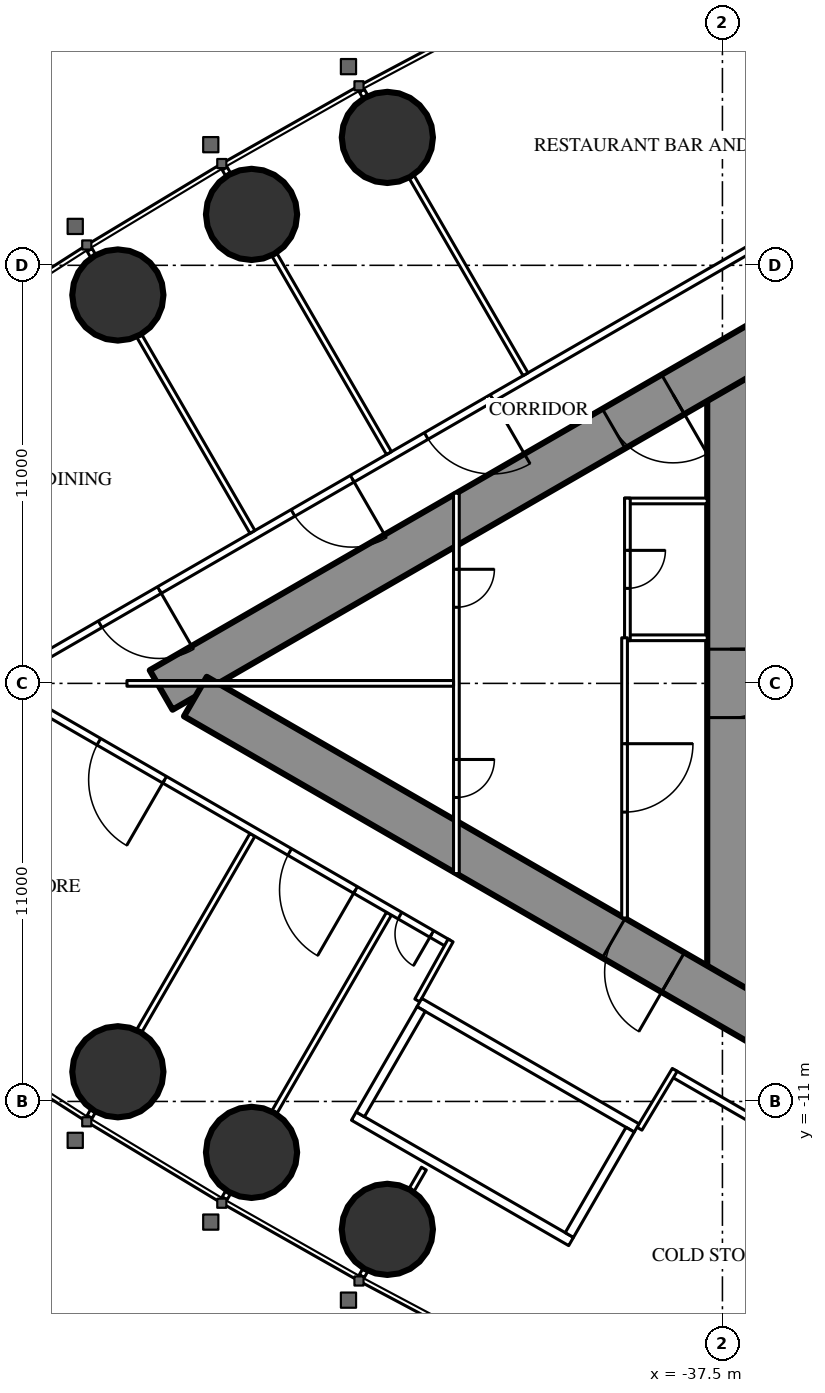
"""IFC4 building model, lengths in metres.
Left out: names, types, materials, properties, quantities, classifications, styles, units other than length and angle.
Written with IfcOpenShell. Run it as: python <this file> out.ifc"""

import sys

from ifc_helpers import new_model, si_unit, direction, frame, frame_2d, origin, origin_2d, place, context, subcontext, project, spatial, rectangle, circle, extrude, element, fill, save


model = new_model("IFC4")
c1 = context("Model", 3, precision=1e-05, world=origin(), true_north=direction((0.0, 1.0)))
c2 = subcontext(c1, "Body", "Model", "MODEL_VIEW")
j1 = project(units=[si_unit("LENGTHUNIT", "METRE"), si_unit("PLANEANGLEUNIT", "RADIAN")], contexts=[c1])
p1 = place(None, origin())
s1 = spatial("IfcSite", under=j1, at=p1, CompositionType="ELEMENT")
p2 = place(p1, origin())
s2 = spatial("IfcBuilding", under=s1, at=p2, CompositionType="ELEMENT")
p3 = place(p2, frame((0.0, 0.0, 251.9)))
s3 = spatial("IfcBuildingStorey", under=s2, at=p3, CompositionType="ELEMENT", Elevation=251.9)
for number, where, z_axis, x_axis in (
    (1, (-53.408, -10.219, 0.0), (0.0, 0.0, 1.0), (1.0, 0.0, 0.0)),
    (2, (-49.89, -12.34, 0.0), (0.0, 0.0, 1.0), (1.0, 0.0, 0.0)),
    (3, (-46.317, -14.365, 0.0), (0.0, 0.0, 1.0), (1.0, 0.0, 0.0)),
    (4, (-46.317, 14.365, 0.0), (0.0, 0.0, 1.0), (1.0, 0.0, 0.0)),
    (5, (-49.89, 12.34, 0.0), (0.0, 0.0, 1.0), (1.0, 0.0, 0.0)),
    (6, (-53.408, 10.219, 0.0), (0.0, 0.0, 1.0), (1.0, 0.0, 0.0)),
):
    element("IfcColumn", number, at=place(p3, frame(where, z_axis=z_axis, x_axis=x_axis)), inside=s3, PredefinedType="COLUMN", context=c2, shape_type="SweptSolid", body=[
        extrude(circle(Radius=1.2, at=origin_2d()), origin(), (0.0, 0.0, 1.0), 5.4),
    ])
p4 = place(p3, frame((-37.3, 8.6, 0.0), z_axis=(0.0, 0.0, 1.0), x_axis=(0.0, -1.0, 0.0)))
e7 = element("IfcWall", 7, at=p4, inside=s3, PredefinedType="SHEAR", context=c2, shape_type="SweptSolid", body=[
    extrude(rectangle(XDim=17.2, YDim=1.2, at=frame_2d((8.6, 0.0))), origin(), (0.0, 0.0, 1.0), 5.4),
])
p5 = place(p4, frame((7.7, 0.0, 0.0)))
e8 = element("IfcOpeningElement", 8, at=p5, cuts=e7, PredefinedType="OPENING", context=c2, shape_type="SweptSolid", body=[
    extrude(rectangle(XDim=1.8, YDim=2.2, at=frame_2d((0.9, 1.1))), frame((0.0, 0.61, 0.0), z_axis=(0.0, -1.0, 0.0), x_axis=(1.0, 0.0, 0.0)), (0.0, 0.0, 1.0), 1.22),
])
p6 = place(p3, frame((-27.2, 14.3, 0.0), z_axis=(0.0, 0.0, 1.0), x_axis=(-0.866026593062, -0.499997940104, 0.0)))
e9 = element("IfcWall", 9, at=p6, inside=s3, PredefinedType="SHEAR", context=c2, shape_type="SweptSolid", body=[
    extrude(rectangle(XDim=28.946, YDim=1.2, at=frame_2d((14.473, 0.0))), origin(), (0.0, 0.0, 1.0), 5.4),
])
p7 = place(p6, frame((4.6, 0.0, 0.0)))
e10 = element("IfcOpeningElement", 10, at=p7, cuts=e9, PredefinedType="OPENING", context=c2, shape_type="SweptSolid", body=[
    extrude(rectangle(XDim=1.0, YDim=2.2, at=frame_2d((0.5, 1.1))), frame((0.0, 0.61, 0.0), z_axis=(0.0, -1.0, 0.0), x_axis=(1.0, 0.0, 0.0)), (0.0, 0.0, 1.0), 1.22),
])
p8 = place(p6, frame((13.395, 0.0, 0.0)))
e11 = element("IfcOpeningElement", 11, at=p8, cuts=e9, PredefinedType="OPENING", context=c2, shape_type="SweptSolid", body=[
    extrude(rectangle(XDim=1.8, YDim=2.2, at=frame_2d((0.9, 1.1))), frame((0.0, 0.61, 0.0), z_axis=(0.0, -1.0, 0.0), x_axis=(1.0, 0.0, 0.0)), (0.0, 0.0, 1.0), 1.22),
])
p9 = place(p3, frame((-27.2, -14.3, 0.0), z_axis=(0.0, 0.0, 1.0), x_axis=(-0.866024021859, 0.500002393557, 0.0)))
e12 = element("IfcWall", 12, at=p9, inside=s3, PredefinedType="SHEAR", context=c2, shape_type="SweptSolid", body=[
    extrude(rectangle(XDim=27.907, YDim=1.2, at=frame_2d((13.954, 0.0))), origin(), (0.0, 0.0, 1.0), 5.4),
])
p10 = place(p9, frame((4.6, 0.0, 0.0)))
e13 = element("IfcOpeningElement", 13, at=p10, cuts=e12, PredefinedType="OPENING", context=c2, shape_type="SweptSolid", body=[
    extrude(rectangle(XDim=1.0, YDim=2.2, at=frame_2d((0.5, 1.1))), frame((0.0, 0.61, 0.0), z_axis=(0.0, -1.0, 0.0), x_axis=(1.0, 0.0, 0.0)), (0.0, 0.0, 1.0), 1.22),
])
p11 = place(p9, frame((13.395, 0.0, 0.0)))
e14 = element("IfcOpeningElement", 14, at=p11, cuts=e12, PredefinedType="OPENING", context=c2, shape_type="SweptSolid", body=[
    extrude(rectangle(XDim=1.8, YDim=2.2, at=frame_2d((0.9, 1.1))), frame((0.0, 0.61, 0.0), z_axis=(0.0, -1.0, 0.0), x_axis=(1.0, 0.0, 0.0)), (0.0, 0.0, 1.0), 1.22),
])
p12 = place(p3, frame((-28.681, 16.101, 0.0), z_axis=(0.0, 0.0, 1.0), x_axis=(-0.866024860443, -0.500000941094, 0.0)))
e15 = element("IfcWall", 15, at=p12, inside=s3, PredefinedType="PARTITIONING", context=c2, shape_type="SweptSolid", body=[
    extrude(rectangle(XDim=32.201, YDim=0.2, at=frame_2d((16.101, 0.0))), origin(), (0.0, 0.0, 1.0), 5.15),
])
p13 = place(p12, frame((7.266, 0.0, 0.0)))
e16 = element("IfcOpeningElement", 16, at=p13, cuts=e15, PredefinedType="OPENING", context=c2, shape_type="SweptSolid", body=[
    extrude(rectangle(XDim=1.8, YDim=2.2, at=frame_2d((0.9, 1.1))), frame((0.0, 0.11, 0.0), z_axis=(0.0, -1.0, 0.0), x_axis=(1.0, 0.0, 0.0)), (0.0, 0.0, 1.0), 0.22),
])
p14 = place(p12, frame((17.182, 0.0, 0.0)))
e17 = element("IfcOpeningElement", 17, at=p14, cuts=e15, PredefinedType="OPENING", context=c2, shape_type="SweptSolid", body=[
    extrude(rectangle(XDim=2.0, YDim=2.4, at=frame_2d((1.0, 1.2))), frame((0.0, 0.11, 0.0), z_axis=(0.0, -1.0, 0.0), x_axis=(1.0, 0.0, 0.0)), (0.0, 0.0, 1.0), 0.22),
])
p15 = place(p12, frame((21.43, 0.0, 0.0)))
e18 = element("IfcOpeningElement", 18, at=p15, cuts=e15, PredefinedType="OPENING", context=c2, shape_type="SweptSolid", body=[
    extrude(rectangle(XDim=1.8, YDim=2.2, at=frame_2d((0.9, 1.1))), frame((0.0, 0.11, 0.0), z_axis=(0.0, -1.0, 0.0), x_axis=(1.0, 0.0, 0.0)), (0.0, 0.0, 1.0), 0.22),
])
p16 = place(p12, frame((27.29, 0.0, 0.0)))
e19 = element("IfcOpeningElement", 19, at=p16, cuts=e15, PredefinedType="OPENING", context=c2, shape_type="SweptSolid", body=[
    extrude(rectangle(XDim=1.8, YDim=2.2, at=frame_2d((0.9, 1.1))), frame((0.0, 0.11, 0.0), z_axis=(0.0, -1.0, 0.0), x_axis=(1.0, 0.0, 0.0)), (0.0, 0.0, 1.0), 0.22),
])
p17 = place(p3, frame((-42.68, 8.134, 0.0), z_axis=(0.0, 0.0, 1.0), x_axis=(-0.499984479505, 0.866034364361, 0.0)))
e20 = element("IfcWall", 20, at=p17, inside=s3, PredefinedType="PARTITIONING", context=c2, shape_type="SweptSolid", body=[
    extrude(rectangle(XDim=5.995, YDim=0.15, at=frame_2d((2.998, 0.0))), origin(), (0.0, 0.0, 1.0), 4.25),
])
p18 = place(p3, frame((-46.898, 15.439, 0.0), z_axis=(0.0, 0.0, 1.0), x_axis=(-0.500232303069, 0.865891241997, 0.0)))
e21 = element("IfcWall", 21, at=p18, inside=s3, PredefinedType="PARTITIONING", context=c2, shape_type="SweptSolid", body=[
    extrude(rectangle(XDim=0.18, YDim=0.15, at=frame_2d((0.09, 0.0))), origin(), (0.0, 0.0, 1.0), 4.25),
])
p19 = place(p3, frame((-46.274, 6.059, 0.0), z_axis=(0.0, 0.0, 1.0), x_axis=(-0.500020471368, 0.866013584312, 0.0)))
e22 = element("IfcWall", 22, at=p19, inside=s3, PredefinedType="PARTITIONING", context=c2, shape_type="SweptSolid", body=[
    extrude(rectangle(XDim=6.028, YDim=0.15, at=frame_2d((3.014, 0.0))), origin(), (0.0, 0.0, 1.0), 4.25),
])
p20 = place(p3, frame((-50.508, 13.392, 0.0), z_axis=(0.0, 0.0, 1.0), x_axis=(-0.499644091975, 0.866230789891, 0.0)))
e23 = element("IfcWall", 23, at=p20, inside=s3, PredefinedType="PARTITIONING", context=c2, shape_type="SweptSolid", body=[
    extrude(rectangle(XDim=0.18, YDim=0.15, at=frame_2d((0.09, 0.0))), origin(), (0.0, 0.0, 1.0), 4.25),
])
p21 = place(p3, frame((-49.866, 3.985, 0.0), z_axis=(0.0, 0.0, 1.0), x_axis=(-0.500000694566, 0.866025002776, 0.0)))
e24 = element("IfcWall", 24, at=p21, inside=s3, PredefinedType="PARTITIONING", context=c2, shape_type="SweptSolid", body=[
    extrude(rectangle(XDim=5.95, YDim=0.15, at=frame_2d((2.975, 0.0))), origin(), (0.0, 0.0, 1.0), 4.25),
])
p22 = place(p3, frame((-54.061, 11.25, 0.0), z_axis=(0.0, 0.0, 1.0), x_axis=(-0.500391173478, 0.865799441849, 0.0)))
e25 = element("IfcWall", 25, at=p22, inside=s3, PredefinedType="PARTITIONING", context=c2, shape_type="SweptSolid", body=[
    extrude(rectangle(XDim=0.179, YDim=0.15, at=frame_2d((0.089, 0.0))), origin(), (0.0, 0.0, 1.0), 4.25),
])
p23 = place(p3, frame((-46.898, -15.439, 0.0), z_axis=(0.0, 0.0, 1.0), x_axis=(-0.500232303069, -0.865891241997, 0.0)))
e26 = element("IfcWall", 26, at=p23, inside=s3, PredefinedType="PARTITIONING", context=c2, shape_type="SweptSolid", body=[
    extrude(rectangle(XDim=0.18, YDim=0.15, at=frame_2d((0.09, 0.0))), origin(), (0.0, 0.0, 1.0), 4.25),
])
p24 = place(p3, frame((-46.274, -6.059, 0.0), z_axis=(0.0, 0.0, 1.0), x_axis=(-0.500020471368, -0.866013584312, 0.0)))
e27 = element("IfcWall", 27, at=p24, inside=s3, PredefinedType="PARTITIONING", context=c2, shape_type="SweptSolid", body=[
    extrude(rectangle(XDim=6.028, YDim=0.15, at=frame_2d((3.014, 0.0))), origin(), (0.0, 0.0, 1.0), 4.25),
])
p25 = place(p3, frame((-50.508, -13.392, 0.0), z_axis=(0.0, 0.0, 1.0), x_axis=(-0.499644091975, -0.866230789891, 0.0)))
e28 = element("IfcWall", 28, at=p25, inside=s3, PredefinedType="PARTITIONING", context=c2, shape_type="SweptSolid", body=[
    extrude(rectangle(XDim=0.18, YDim=0.15, at=frame_2d((0.09, 0.0))), origin(), (0.0, 0.0, 1.0), 4.25),
])
p26 = place(p3, frame((-49.866, -3.985, 0.0), z_axis=(0.0, 0.0, 1.0), x_axis=(-0.500000694566, -0.866025002776, 0.0)))
e29 = element("IfcWall", 29, at=p26, inside=s3, PredefinedType="PARTITIONING", context=c2, shape_type="SweptSolid", body=[
    extrude(rectangle(XDim=5.95, YDim=0.15, at=frame_2d((2.975, 0.0))), origin(), (0.0, 0.0, 1.0), 4.25),
])
p27 = place(p3, frame((-54.061, -11.25, 0.0), z_axis=(0.0, 0.0, 1.0), x_axis=(-0.500391173478, -0.865799441849, 0.0)))
e30 = element("IfcWall", 30, at=p27, inside=s3, PredefinedType="PARTITIONING", context=c2, shape_type="SweptSolid", body=[
    extrude(rectangle(XDim=0.179, YDim=0.15, at=frame_2d((0.089, 0.0))), origin(), (0.0, 0.0, 1.0), 4.25),
])
p28 = place(p3, frame((-45.356, -12.767, 0.0), z_axis=(0.0, 0.0, 1.0), x_axis=(-0.499886366516, -0.866091000168, 0.0)))
e31 = element("IfcWall", 31, at=p28, inside=s3, PredefinedType="PARTITIONING", context=c2, shape_type="SweptSolid", body=[
    extrude(rectangle(XDim=0.645, YDim=0.15, at=frame_2d((0.322, 0.0))), origin(), (0.0, 0.0, 1.0), 5.15),
])
p29 = place(p3, frame((-28.681, -16.101, 0.0), z_axis=(0.0, 0.0, 1.0), x_axis=(-0.866026079773, 0.499998829152, 0.0)))
e32 = element("IfcWall", 32, at=p29, inside=s3, PredefinedType="PARTITIONING", context=c2, shape_type="SweptSolid", body=[
    extrude(rectangle(XDim=11.674, YDim=0.2, at=frame_2d((5.837, 0.0))), origin(), (0.0, 0.0, 1.0), 5.15),
])
p30 = place(p29, frame((4.837, 0.0, 0.0)))
e33 = element("IfcOpeningElement", 33, at=p30, cuts=e32, PredefinedType="OPENING", context=c2, shape_type="SweptSolid", body=[
    extrude(rectangle(XDim=2.0, YDim=2.4, at=frame_2d((1.0, 1.2))), frame((0.0, 0.11, 0.0), z_axis=(0.0, -1.0, 0.0), x_axis=(1.0, 0.0, 0.0)), (0.0, 0.0, 1.0), 0.22),
])
p31 = place(p3, frame((-44.715, -6.844, 0.0), z_axis=(0.0, 0.0, 1.0), x_axis=(-0.866025261224, 0.500000246922, 0.0)))
e34 = element("IfcWall", 34, at=p31, inside=s3, PredefinedType="PARTITIONING", context=c2, shape_type="SweptSolid", body=[
    extrude(rectangle(XDim=13.567, YDim=0.2, at=frame_2d((6.783, 0.0))), origin(), (0.0, 0.0, 1.0), 5.15),
])
p32 = place(p31, frame((8.616, 0.0, 0.0)))
e35 = element("IfcOpeningElement", 35, at=p32, cuts=e34, PredefinedType="OPENING", context=c2, shape_type="SweptSolid", body=[
    extrude(rectangle(XDim=2.0, YDim=2.4, at=frame_2d((1.0, 1.2))), frame((0.0, 0.11, 0.0), z_axis=(0.0, -1.0, 0.0), x_axis=(1.0, 0.0, 0.0)), (0.0, 0.0, 1.0), 0.22),
])
p33 = place(p31, frame((2.816, 0.0, 0.0)))
e36 = element("IfcOpeningElement", 36, at=p33, cuts=e34, PredefinedType="OPENING", context=c2, shape_type="SweptSolid", body=[
    extrude(rectangle(XDim=2.0, YDim=2.4, at=frame_2d((1.0, 1.2))), frame((0.0, 0.11, 0.0), z_axis=(0.0, -1.0, 0.0), x_axis=(1.0, 0.0, 0.0)), (0.0, 0.0, 1.0), 0.22),
])
p34 = place(p31, frame((0.5, 0.0, 0.0)))
e37 = element("IfcOpeningElement", 37, at=p34, cuts=e34, PredefinedType="OPENING", context=c2, shape_type="SweptSolid", body=[
    extrude(rectangle(XDim=0.967, YDim=2.2, at=frame_2d((0.483, 1.1))), frame((0.0, 0.11, 0.0), z_axis=(0.0, -1.0, 0.0), x_axis=(1.0, 0.0, 0.0)), (0.0, 0.0, 1.0), 0.22),
])
for number, where, z_axis, x_axis in (
    (38, (-44.652, -6.764, 0.0), (0.0, 0.0, 1.0), (-0.486, -0.874, 0.0)),
    (39, (-39.683, -11.718, 0.0), (0.0, 0.0, 1.0), (0.514, 0.858, 0.0)),
):
    element("IfcWall", number, at=place(p3, frame(where, z_axis=z_axis, x_axis=x_axis)), inside=s3, PredefinedType="PARTITIONING", context=c2, shape_type="SweptSolid", body=[
        extrude(rectangle(XDim=1.805, YDim=0.15, at=frame_2d((0.903, 0.0))), origin(), (0.0, 0.0, 1.0), 5.15),
    ])
for number, where, z_axis, x_axis in (
    (40, (-37.9, 1.2, 0.0), (0.0, 0.0, 1.0), (-1.0, 0.0, 0.0)),
    (41, (-37.9, 4.8, 0.0), (0.0, 0.0, 1.0), (-1.0, 0.0, 0.0)),
):
    element("IfcWall", number, at=place(p3, frame(where, z_axis=z_axis, x_axis=x_axis)), inside=s3, PredefinedType="PARTITIONING", context=c2, shape_type="SweptSolid", body=[
        extrude(rectangle(XDim=2.175, YDim=0.15, at=frame_2d((1.087, 0.0))), origin(), (0.0, 0.0, 1.0), 5.15),
    ])
p35 = place(p3, frame((-40.0, 4.875, 0.0), z_axis=(0.0, 0.0, 1.0), x_axis=(0.0, -1.0, 0.0)))
e42 = element("IfcWall", 42, at=p35, inside=s3, PredefinedType="PARTITIONING", context=c2, shape_type="SweptSolid", body=[
    extrude(rectangle(XDim=3.75, YDim=0.15, at=frame_2d((1.875, 0.0))), origin(), (0.0, 0.0, 1.0), 5.15),
])
p36 = place(p35, frame((1.375, 0.0, 0.0)))
e43 = element("IfcOpeningElement", 43, at=p36, cuts=e42, PredefinedType="OPENING", context=c2, shape_type="SweptSolid", body=[
    extrude(rectangle(XDim=1.0, YDim=2.2, at=frame_2d((0.5, 1.1))), frame((0.0, 0.085, 0.0), z_axis=(0.0, -1.0, 0.0), x_axis=(1.0, 0.0, 0.0)), (0.0, 0.0, 1.0), 0.17),
])
p37 = place(p3, frame((-40.075, 1.2, 0.0), z_axis=(0.0, 0.0, 1.0), x_axis=(0.0, -1.0, 0.0)))
e44 = element("IfcWall", 44, at=p37, inside=s3, PredefinedType="PARTITIONING", context=c2, shape_type="SweptSolid", body=[
    extrude(rectangle(XDim=7.374, YDim=0.15, at=frame_2d((3.687, 0.0))), origin(), (0.0, 0.0, 1.0), 5.15),
])
p38 = place(p37, frame((2.787, 0.0, 0.0)))
e45 = element("IfcOpeningElement", 45, at=p38, cuts=e44, PredefinedType="OPENING", context=c2, shape_type="SweptSolid", body=[
    extrude(rectangle(XDim=1.8, YDim=2.2, at=frame_2d((0.9, 1.1))), frame((0.0, 0.085, 0.0), z_axis=(0.0, -1.0, 0.0), x_axis=(1.0, 0.0, 0.0)), (0.0, 0.0, 1.0), 0.17),
])
p39 = place(p3, frame((-44.5, 5.005, 0.0), z_axis=(0.0, 0.0, 1.0), x_axis=(0.0, -1.0, 0.0)))
e46 = element("IfcWall", 46, at=p39, inside=s3, PredefinedType="PARTITIONING", context=c2, shape_type="SweptSolid", body=[
    extrude(rectangle(XDim=10.009, YDim=0.15, at=frame_2d((5.005, 0.0))), origin(), (0.0, 0.0, 1.0), 4.3),
])
p40 = place(p39, frame((2.002, 0.0, 0.0)))
e47 = element("IfcOpeningElement", 47, at=p40, cuts=e46, PredefinedType="OPENING", context=c2, shape_type="SweptSolid", body=[
    extrude(rectangle(XDim=1.0, YDim=2.2, at=frame_2d((0.5, 1.1))), frame((0.0, 0.085, 0.0), z_axis=(0.0, -1.0, 0.0), x_axis=(1.0, 0.0, 0.0)), (0.0, 0.0, 1.0), 0.17),
])
p41 = place(p39, frame((7.007, 0.0, 0.0)))
e48 = element("IfcOpeningElement", 48, at=p41, cuts=e46, PredefinedType="OPENING", context=c2, shape_type="SweptSolid", body=[
    extrude(rectangle(XDim=1.0, YDim=2.2, at=frame_2d((0.5, 1.1))), frame((0.0, 0.085, 0.0), z_axis=(0.0, -1.0, 0.0), x_axis=(1.0, 0.0, 0.0)), (0.0, 0.0, 1.0), 0.17),
])
p42 = place(p3, frame((-44.575, 0.0, 0.0), z_axis=(0.0, 0.0, 1.0), x_axis=(-1.0, 0.0, 0.0)))
e49 = element("IfcWall", 49, at=p42, inside=s3, PredefinedType="PARTITIONING", context=c2, shape_type="SweptSolid", body=[
    extrude(rectangle(XDim=8.593, YDim=0.15, at=frame_2d((4.297, 0.0))), origin(), (0.0, 0.0, 1.0), 4.25),
])
p43 = place(p3, frame((-39.758, -11.697, 0.0), z_axis=(0.0, 0.0, 1.0), x_axis=(-0.866024194504, 0.500002094529, 0.0)))
e50 = element("IfcWall", 50, at=p43, inside=s3, PredefinedType="PARTITIONING", context=c2, shape_type="SweptSolid", body=[
    extrude(rectangle(XDim=6.6, YDim=0.25, at=frame_2d((3.3, 0.0))), origin(), (0.0, 0.0, 1.0), 5.15),
])
p44 = place(p3, frame((-41.482, -14.686, 0.0), z_axis=(0.0, 0.0, 1.0), x_axis=(-0.86603344179, 0.499986077507, 0.0)))
e51 = element("IfcWall", 51, at=p44, inside=s3, PredefinedType="PARTITIONING", context=c2, shape_type="SweptSolid", body=[
    extrude(rectangle(XDim=6.6, YDim=0.25, at=frame_2d((3.3, 0.0))), origin(), (0.0, 0.0, 1.0), 5.15),
])
for number, where, z_axis, x_axis in (
    (52, (-39.928, -11.743, 0.0), (0.0, 0.0, 1.0), (-0.5, -0.866, 0.0)),
    (53, (-45.428, -8.568, 0.0), (0.0, 0.0, 1.0), (-0.5, -0.866, 0.0)),
):
    element("IfcWall", number, at=place(p3, frame(where, z_axis=z_axis, x_axis=x_axis)), inside=s3, PredefinedType="PARTITIONING", context=c2, shape_type="SweptSolid", body=[
        extrude(rectangle(XDim=3.201, YDim=0.25, at=frame_2d((1.6, 0.0))), origin(), (0.0, 0.0, 1.0), 5.15),
    ])
p45 = place(p14, origin())
e54 = element("IfcDoor", 54, at=p45, inside=s3, OperationType="DOUBLE_DOOR_SINGLE_SWING", PredefinedType="DOOR", context=c2, shape_type="SweptSolid", body=[
    extrude(rectangle(XDim=2.0, YDim=2.4, at=frame_2d((1.0, 1.2))), frame((0.0, 0.025, 0.0), z_axis=(0.0, -1.0, 0.0), x_axis=(1.0, 0.0, 0.0)), (0.0, 0.0, 1.0), 0.05),
])
fill(e17, e54)
p46 = place(p15, origin())
e55 = element("IfcDoor", 55, at=p46, inside=s3, OperationType="DOUBLE_DOOR_SINGLE_SWING", PredefinedType="DOOR", context=c2, shape_type="SweptSolid", body=[
    extrude(rectangle(XDim=1.8, YDim=2.2, at=frame_2d((0.9, 1.1))), frame((0.0, 0.025, 0.0), z_axis=(0.0, -1.0, 0.0), x_axis=(1.0, 0.0, 0.0)), (0.0, 0.0, 1.0), 0.05),
])
fill(e18, e55)
p47 = place(p16, origin())
e56 = element("IfcDoor", 56, at=p47, inside=s3, OperationType="DOUBLE_DOOR_SINGLE_SWING", PredefinedType="DOOR", context=c2, shape_type="SweptSolid", body=[
    extrude(rectangle(XDim=1.8, YDim=2.2, at=frame_2d((0.9, 1.1))), frame((0.0, 0.025, 0.0), z_axis=(0.0, -1.0, 0.0), x_axis=(1.0, 0.0, 0.0)), (0.0, 0.0, 1.0), 0.05),
])
fill(e19, e56)
p48 = place(p32, origin())
e57 = element("IfcDoor", 57, at=p48, inside=s3, OperationType="DOUBLE_DOOR_SINGLE_SWING", PredefinedType="DOOR", context=c2, shape_type="SweptSolid", body=[
    extrude(rectangle(XDim=2.0, YDim=2.4, at=frame_2d((1.0, 1.2))), frame((0.0, 0.025, 0.0), z_axis=(0.0, -1.0, 0.0), x_axis=(1.0, 0.0, 0.0)), (0.0, 0.0, 1.0), 0.05),
])
fill(e35, e57)
p49 = place(p33, origin())
e58 = element("IfcDoor", 58, at=p49, inside=s3, OperationType="DOUBLE_DOOR_SINGLE_SWING", PredefinedType="DOOR", context=c2, shape_type="SweptSolid", body=[
    extrude(rectangle(XDim=2.0, YDim=2.4, at=frame_2d((1.0, 1.2))), frame((0.0, 0.025, 0.0), z_axis=(0.0, -1.0, 0.0), x_axis=(1.0, 0.0, 0.0)), (0.0, 0.0, 1.0), 0.05),
])
fill(e36, e58)
p50 = place(p34, origin())
e59 = element("IfcDoor", 59, at=p50, inside=s3, OperationType="SINGLE_SWING_LEFT", PredefinedType="DOOR", context=c2, shape_type="SweptSolid", body=[
    extrude(rectangle(XDim=0.967, YDim=2.2, at=frame_2d((0.483, 1.1))), frame((0.0, 0.025, 0.0), z_axis=(0.0, -1.0, 0.0), x_axis=(1.0, 0.0, 0.0)), (0.0, 0.0, 1.0), 0.05),
])
fill(e37, e59)
p51 = place(p36, origin())
e60 = element("IfcDoor", 60, at=p51, inside=s3, OperationType="SINGLE_SWING_LEFT", PredefinedType="DOOR", context=c2, shape_type="SweptSolid", body=[
    extrude(rectangle(XDim=1.0, YDim=2.2, at=frame_2d((0.5, 1.1))), frame((0.0, 0.025, 0.0), z_axis=(0.0, -1.0, 0.0), x_axis=(1.0, 0.0, 0.0)), (0.0, 0.0, 1.0), 0.05),
])
fill(e43, e60)
p52 = place(p38, origin())
e61 = element("IfcDoor", 61, at=p52, inside=s3, OperationType="DOUBLE_DOOR_SINGLE_SWING", PredefinedType="DOOR", context=c2, shape_type="SweptSolid", body=[
    extrude(rectangle(XDim=1.8, YDim=2.2, at=frame_2d((0.9, 1.1))), frame((0.0, 0.025, 0.0), z_axis=(0.0, -1.0, 0.0), x_axis=(1.0, 0.0, 0.0)), (0.0, 0.0, 1.0), 0.05),
])
fill(e45, e61)
p53 = place(p40, origin())
e62 = element("IfcDoor", 62, at=p53, inside=s3, OperationType="SINGLE_SWING_LEFT", PredefinedType="DOOR", context=c2, shape_type="SweptSolid", body=[
    extrude(rectangle(XDim=1.0, YDim=2.2, at=frame_2d((0.5, 1.1))), frame((0.0, 0.025, 0.0), z_axis=(0.0, -1.0, 0.0), x_axis=(1.0, 0.0, 0.0)), (0.0, 0.0, 1.0), 0.05),
])
fill(e47, e62)
p54 = place(p41, origin())
e63 = element("IfcDoor", 63, at=p54, inside=s3, OperationType="SINGLE_SWING_LEFT", PredefinedType="DOOR", context=c2, shape_type="SweptSolid", body=[
    extrude(rectangle(XDim=1.0, YDim=2.2, at=frame_2d((0.5, 1.1))), frame((0.0, 0.025, 0.0), z_axis=(0.0, -1.0, 0.0), x_axis=(1.0, 0.0, 0.0)), (0.0, 0.0, 1.0), 0.05),
])
fill(e48, e63)
p55 = place(p8, origin())
e64 = element("IfcDoor", 64, at=p55, inside=s3, OperationType="DOUBLE_DOOR_SINGLE_SWING", PredefinedType="DOOR", context=c2, shape_type="SweptSolid", body=[
    extrude(rectangle(XDim=1.8, YDim=2.2, at=frame_2d((0.9, 1.1))), frame((0.0, 0.025, 0.0), z_axis=(0.0, -1.0, 0.0), x_axis=(1.0, 0.0, 0.0)), (0.0, 0.0, 1.0), 0.05),
])
fill(e11, e64)
p56 = place(p11, origin())
e65 = element("IfcDoor", 65, at=p56, inside=s3, OperationType="DOUBLE_DOOR_SINGLE_SWING", PredefinedType="DOOR", context=c2, shape_type="SweptSolid", body=[
    extrude(rectangle(XDim=1.8, YDim=2.2, at=frame_2d((0.9, 1.1))), frame((0.0, 0.025, 0.0), z_axis=(0.0, -1.0, 0.0), x_axis=(1.0, 0.0, 0.0)), (0.0, 0.0, 1.0), 0.05),
])
fill(e14, e65)
p57 = place(p5, origin())
e66 = element("IfcDoor", 66, at=p57, inside=s3, OperationType="DOUBLE_DOOR_SINGLE_SWING", PredefinedType="DOOR", context=c2, shape_type="SweptSolid", body=[
    extrude(rectangle(XDim=1.8, YDim=2.2, at=frame_2d((0.9, 1.1))), frame((0.0, 0.025, 0.0), z_axis=(0.0, -1.0, 0.0), x_axis=(1.0, 0.0, 0.0)), (0.0, 0.0, 1.0), 0.05),
])
fill(e8, e66)
save(model, sys.argv[1])
